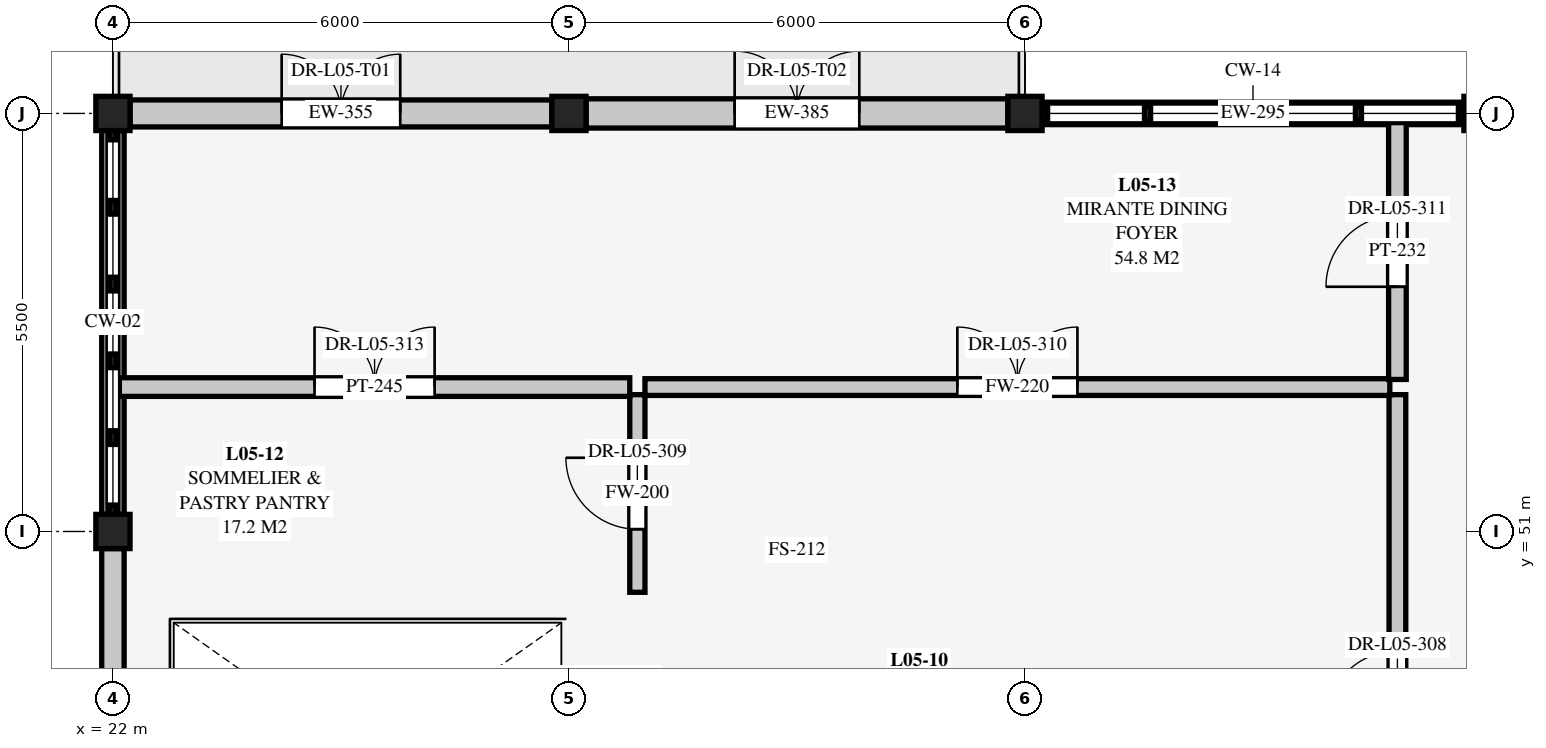
"""IFC4 building model, lengths in metres.
Left out: names, types, materials, properties, quantities, classifications, styles, units other than length and angle.
Written with IfcOpenShell. Run it as: python <this file> out.ifc"""

import sys

from ifc_helpers import new_model, si_unit, direction, frame, frame_2d, origin, origin_2d, place, context, subcontext, project, spatial, rectangle, extrude, element, fill, save


model = new_model("IFC4")
c1 = context("Model", 3, precision=1e-05, world=origin(), true_north=direction((0.0, 1.0)))
c2 = subcontext(c1, "Body", "Model", "MODEL_VIEW")
j1 = project(units=[si_unit("LENGTHUNIT", "METRE"), si_unit("PLANEANGLEUNIT", "RADIAN")], contexts=[c1])
p1 = place(None, origin())
s1 = spatial("IfcSite", under=j1, at=p1, CompositionType="ELEMENT")
p2 = place(p1, origin())
s2 = spatial("IfcBuilding", under=s1, at=p2, CompositionType="ELEMENT")
p3 = place(p2, frame((0.0, 0.0, 18.0)))
s3 = spatial("IfcBuildingStorey", under=s2, at=p3, CompositionType="ELEMENT", Elevation=18.0)
for number, where, z_axis, x_axis in (
    (1, (22.0, 51.0, 0.0), (0.0, 0.0, 1.0), (1.0, 0.0, 0.0)),
    (2, (22.0, 56.5, 0.0), (0.0, 0.0, 1.0), (1.0, 0.0, 0.0)),
    (3, (28.0, 56.5, 0.0), (0.0, 0.0, 1.0), (1.0, 0.0, 0.0)),
    (4, (34.0, 56.5, 0.0), (0.0, 0.0, 1.0), (1.0, 0.0, 0.0)),
    (5, (40.0, 56.5, 0.0), (0.0, 0.0, 1.0), (1.0, 0.0, 0.0)),
):
    element("IfcColumn", number, at=place(p3, frame(where, z_axis=z_axis, x_axis=x_axis)), inside=s3, PredefinedType="COLUMN", context=c2, shape_type="SweptSolid", body=[
        extrude(rectangle(XDim=0.45, YDim=0.45, at=origin_2d()), origin(), (0.0, 0.0, 1.0), 4.5),
    ])
p4 = place(p3, frame((22.225, 56.5, 0.0), z_axis=(0.0, 0.0, 1.0), x_axis=(1.0, 0.0, 0.0)))
e6 = element("IfcWall", 6, at=p4, inside=s3, PredefinedType="SOLIDWALL", context=c2, shape_type="SweptSolid", body=[
    extrude(rectangle(XDim=5.55, YDim=0.355, at=frame_2d((2.775, 0.0))), origin(), (0.0, 0.0, 1.0), 4.194),
])
p5 = place(p4, frame((1.995, 0.0, 0.0)))
e7 = element("IfcOpeningElement", 7, at=p5, cuts=e6, PredefinedType="OPENING", context=c2, shape_type="SweptSolid", body=[
    extrude(rectangle(XDim=1.56, YDim=2.18, at=frame_2d((0.78, 1.09))), frame((0.0, 0.188, 0.0), z_axis=(0.0, -1.0, 0.0), x_axis=(1.0, 0.0, 0.0)), (0.0, 0.0, 1.0), 0.375),
])
p6 = place(p3, frame((28.225, 56.5, 0.0), z_axis=(0.0, 0.0, 1.0), x_axis=(1.0, 0.0, 0.0)))
e8 = element("IfcWall", 8, at=p6, inside=s3, PredefinedType="SOLIDWALL", context=c2, shape_type="SweptSolid", body=[
    extrude(rectangle(XDim=5.55, YDim=0.385, at=frame_2d((2.775, 0.0))), origin(), (0.0, 0.0, 1.0), 4.234),
])
p7 = place(p6, frame((1.955, 0.0, 0.0)))
e9 = element("IfcOpeningElement", 9, at=p7, cuts=e8, PredefinedType="OPENING", context=c2, shape_type="SweptSolid", body=[
    extrude(rectangle(XDim=1.64, YDim=2.22, at=frame_2d((0.82, 1.11))), frame((0.0, 0.202, 0.0), z_axis=(0.0, -1.0, 0.0), x_axis=(1.0, 0.0, 0.0)), (0.0, 0.0, 1.0), 0.405),
])
p8 = place(p3, frame((34.225, 56.5, 0.0), z_axis=(0.0, 0.0, 1.0), x_axis=(1.0, 0.0, 0.0)))
e10 = element("IfcWall", 10, at=p8, inside=s3, PredefinedType="SOLIDWALL", context=c2, shape_type="SweptSolid", body=[
    extrude(rectangle(XDim=5.55, YDim=0.295, at=frame_2d((2.775, 0.0))), origin(), (0.0, 0.0, 1.0), 0.41),
])
p9 = place(p3, frame((22.0, 45.225, 0.0), z_axis=(0.0, 0.0, 1.0), x_axis=(0.0, 1.0, 0.0)))
e11 = element("IfcWall", 11, at=p9, inside=s3, PredefinedType="SOLIDWALL", context=c2, shape_type="SweptSolid", body=[
    extrude(rectangle(XDim=5.55, YDim=0.295, at=frame_2d((2.775, 0.0))), origin(), (0.0, 0.0, 1.0), 4.093),
])
p10 = place(p9, frame((2.05, 0.0, 0.75)))
e12 = element("IfcOpeningElement", 12, at=p10, cuts=e11, PredefinedType="OPENING", context=c2, shape_type="SweptSolid", body=[
    extrude(rectangle(XDim=1.45, YDim=2.25, at=frame_2d((0.725, 1.125))), frame((0.0, 0.157, 0.0), z_axis=(0.0, -1.0, 0.0), x_axis=(1.0, 0.0, 0.0)), (0.0, 0.0, 1.0), 0.315),
])
p11 = place(p3, frame((22.0, 51.225, 0.0), z_axis=(0.0, 0.0, 1.0), x_axis=(0.0, 1.0, 0.0)))
e13 = element("IfcWall", 13, at=p11, inside=s3, PredefinedType="SOLIDWALL", context=c2, shape_type="SweptSolid", body=[
    extrude(rectangle(XDim=5.05, YDim=0.295, at=frame_2d((2.525, 0.0))), origin(), (0.0, 0.0, 1.0), 0.21),
])
p12 = place(p3, frame((38.9, 45.118, 0.0), z_axis=(0.0, 0.0, 1.0), x_axis=(0.0, 1.0, 0.0)))
e14 = element("IfcWall", 14, at=p12, inside=s3, PredefinedType="SOLIDWALL", context=c2, shape_type="SweptSolid", body=[
    extrude(rectangle(XDim=7.682, YDim=0.22, at=frame_2d((3.841, 0.0))), origin(), (0.0, 0.0, 1.0), 4.24),
])
p13 = place(p12, frame((3.371, 0.0, 0.0)))
e15 = element("IfcOpeningElement", 15, at=p13, cuts=e14, PredefinedType="OPENING", context=c2, shape_type="SweptSolid", body=[
    extrude(rectangle(XDim=0.94, YDim=2.1, at=frame_2d((0.47, 1.05))), frame((0.0, 0.12, 0.0), z_axis=(0.0, -1.0, 0.0), x_axis=(1.0, 0.0, 0.0)), (0.0, 0.0, 1.0), 0.24),
])
p14 = place(p3, frame((28.9, 50.2, 0.0), z_axis=(0.0, 0.0, 1.0), x_axis=(0.0, 1.0, 0.0)))
e16 = element("IfcWall", 16, at=p14, inside=s3, PredefinedType="SOLIDWALL", context=c2, shape_type="SweptSolid", body=[
    extrude(rectangle(XDim=2.6, YDim=0.2, at=frame_2d((1.3, 0.0))), origin(), (0.0, 0.0, 1.0), 4.24),
])
p15 = place(p14, frame((0.83, 0.0, 0.0)))
e17 = element("IfcOpeningElement", 17, at=p15, cuts=e16, PredefinedType="OPENING", context=c2, shape_type="SweptSolid", body=[
    extrude(rectangle(XDim=0.94, YDim=2.1, at=frame_2d((0.47, 1.05))), frame((0.0, 0.11, 0.0), z_axis=(0.0, -1.0, 0.0), x_axis=(1.0, 0.0, 0.0)), (0.0, 0.0, 1.0), 0.22),
])
p16 = place(p3, frame((29.0, 52.9, 0.0), z_axis=(0.0, 0.0, 1.0), x_axis=(1.0, 0.0, 0.0)))
e18 = element("IfcWall", 18, at=p16, inside=s3, PredefinedType="SOLIDWALL", context=c2, shape_type="SweptSolid", body=[
    extrude(rectangle(XDim=9.8, YDim=0.22, at=frame_2d((4.9, 0.0))), origin(), (0.0, 0.0, 1.0), 4.24),
])
p17 = place(p16, frame((4.11, 0.0, 0.0)))
e19 = element("IfcOpeningElement", 19, at=p17, cuts=e18, PredefinedType="OPENING", context=c2, shape_type="SweptSolid", body=[
    extrude(rectangle(XDim=1.58, YDim=2.2, at=frame_2d((0.79, 1.1))), frame((0.0, 0.12, 0.0), z_axis=(0.0, -1.0, 0.0), x_axis=(1.0, 0.0, 0.0)), (0.0, 0.0, 1.0), 0.24),
])
p18 = place(p3, frame((38.9, 53.0, 0.0), z_axis=(0.0, 0.0, 1.0), x_axis=(0.0, 1.0, 0.0)))
e20 = element("IfcWall", 20, at=p18, inside=s3, PredefinedType="PARTITIONING", context=c2, shape_type="SweptSolid", body=[
    extrude(rectangle(XDim=3.379, YDim=0.232, at=frame_2d((1.689, 0.0))), origin(), (0.0, 0.0, 1.0), 4.24),
])
p19 = place(p18, frame((1.219, 0.0, 0.0)))
e21 = element("IfcOpeningElement", 21, at=p19, cuts=e20, PredefinedType="OPENING", context=c2, shape_type="SweptSolid", body=[
    extrude(rectangle(XDim=0.94, YDim=2.1, at=frame_2d((0.47, 1.05))), frame((0.0, 0.126, 0.0), z_axis=(0.0, -1.0, 0.0), x_axis=(1.0, 0.0, 0.0)), (0.0, 0.0, 1.0), 0.252),
])
p20 = place(p3, frame((22.085, 52.9, 0.0), z_axis=(0.0, 0.0, 1.0), x_axis=(1.0, 0.0, 0.0)))
e22 = element("IfcWall", 22, at=p20, inside=s3, PredefinedType="PARTITIONING", context=c2, shape_type="SweptSolid", body=[
    extrude(rectangle(XDim=6.715, YDim=0.245, at=frame_2d((3.357, 0.0))), origin(), (0.0, 0.0, 1.0), 4.24),
])
p21 = place(p20, frame((2.567, 0.0, 0.0)))
e23 = element("IfcOpeningElement", 23, at=p21, cuts=e22, PredefinedType="OPENING", context=c2, shape_type="SweptSolid", body=[
    extrude(rectangle(XDim=1.58, YDim=2.2, at=frame_2d((0.79, 1.1))), frame((0.0, 0.133, 0.0), z_axis=(0.0, -1.0, 0.0), x_axis=(1.0, 0.0, 0.0)), (0.0, 0.0, 1.0), 0.265),
])
p22 = place(p5, origin())
e24 = element("IfcDoor", 24, at=p22, inside=s3, OperationType="DOUBLE_DOOR_SINGLE_SWING", PredefinedType="DOOR", context=c2, shape_type="SweptSolid", body=[
    extrude(rectangle(XDim=1.56, YDim=2.18, at=frame_2d((0.78, 1.09))), frame((0.0, 0.025, 0.0), z_axis=(0.0, -1.0, 0.0), x_axis=(1.0, 0.0, 0.0)), (0.0, 0.0, 1.0), 0.05),
])
fill(e7, e24)
p23 = place(p7, origin())
e25 = element("IfcDoor", 25, at=p23, inside=s3, OperationType="DOUBLE_DOOR_SINGLE_SWING", PredefinedType="DOOR", context=c2, shape_type="SweptSolid", body=[
    extrude(rectangle(XDim=1.64, YDim=2.22, at=frame_2d((0.82, 1.11))), frame((0.0, 0.025, 0.0), z_axis=(0.0, -1.0, 0.0), x_axis=(1.0, 0.0, 0.0)), (0.0, 0.0, 1.0), 0.05),
])
fill(e9, e25)
p24 = place(p13, origin())
e26 = element("IfcDoor", 26, at=p24, inside=s3, OperationType="SINGLE_SWING_LEFT", PredefinedType="DOOR", context=c2, shape_type="SweptSolid", body=[
    extrude(rectangle(XDim=0.94, YDim=2.1, at=frame_2d((0.47, 1.05))), frame((0.0, 0.025, 0.0), z_axis=(0.0, -1.0, 0.0), x_axis=(1.0, 0.0, 0.0)), (0.0, 0.0, 1.0), 0.05),
])
fill(e15, e26)
p25 = place(p15, origin())
e27 = element("IfcDoor", 27, at=p25, inside=s3, OperationType="SINGLE_SWING_RIGHT", PredefinedType="DOOR", context=c2, shape_type="SweptSolid", body=[
    extrude(rectangle(XDim=0.94, YDim=2.1, at=frame_2d((0.47, 1.05))), frame((0.0, 0.025, 0.0), z_axis=(0.0, -1.0, 0.0), x_axis=(1.0, 0.0, 0.0)), (0.0, 0.0, 1.0), 0.05),
])
fill(e17, e27)
p26 = place(p17, origin())
e28 = element("IfcDoor", 28, at=p26, inside=s3, OperationType="DOUBLE_DOOR_SINGLE_SWING", PredefinedType="DOOR", context=c2, shape_type="SweptSolid", body=[
    extrude(rectangle(XDim=1.58, YDim=2.2, at=frame_2d((0.79, 1.1))), frame((0.0, 0.025, 0.0), z_axis=(0.0, -1.0, 0.0), x_axis=(1.0, 0.0, 0.0)), (0.0, 0.0, 1.0), 0.05),
])
fill(e19, e28)
p27 = place(p19, origin())
e29 = element("IfcDoor", 29, at=p27, inside=s3, OperationType="SINGLE_SWING_LEFT", PredefinedType="DOOR", context=c2, shape_type="SweptSolid", body=[
    extrude(rectangle(XDim=0.94, YDim=2.1, at=frame_2d((0.47, 1.05))), frame((0.0, 0.025, 0.0), z_axis=(0.0, -1.0, 0.0), x_axis=(1.0, 0.0, 0.0)), (0.0, 0.0, 1.0), 0.05),
])
fill(e21, e29)
p28 = place(p21, origin())
e30 = element("IfcDoor", 30, at=p28, inside=s3, OperationType="DOUBLE_DOOR_SINGLE_SWING", PredefinedType="DOOR", context=c2, shape_type="SweptSolid", body=[
    extrude(rectangle(XDim=1.58, YDim=2.2, at=frame_2d((0.79, 1.1))), frame((0.0, 0.025, 0.0), z_axis=(0.0, -1.0, 0.0), x_axis=(1.0, 0.0, 0.0)), (0.0, 0.0, 1.0), 0.05),
])
fill(e23, e30)
save(model, sys.argv[1])
